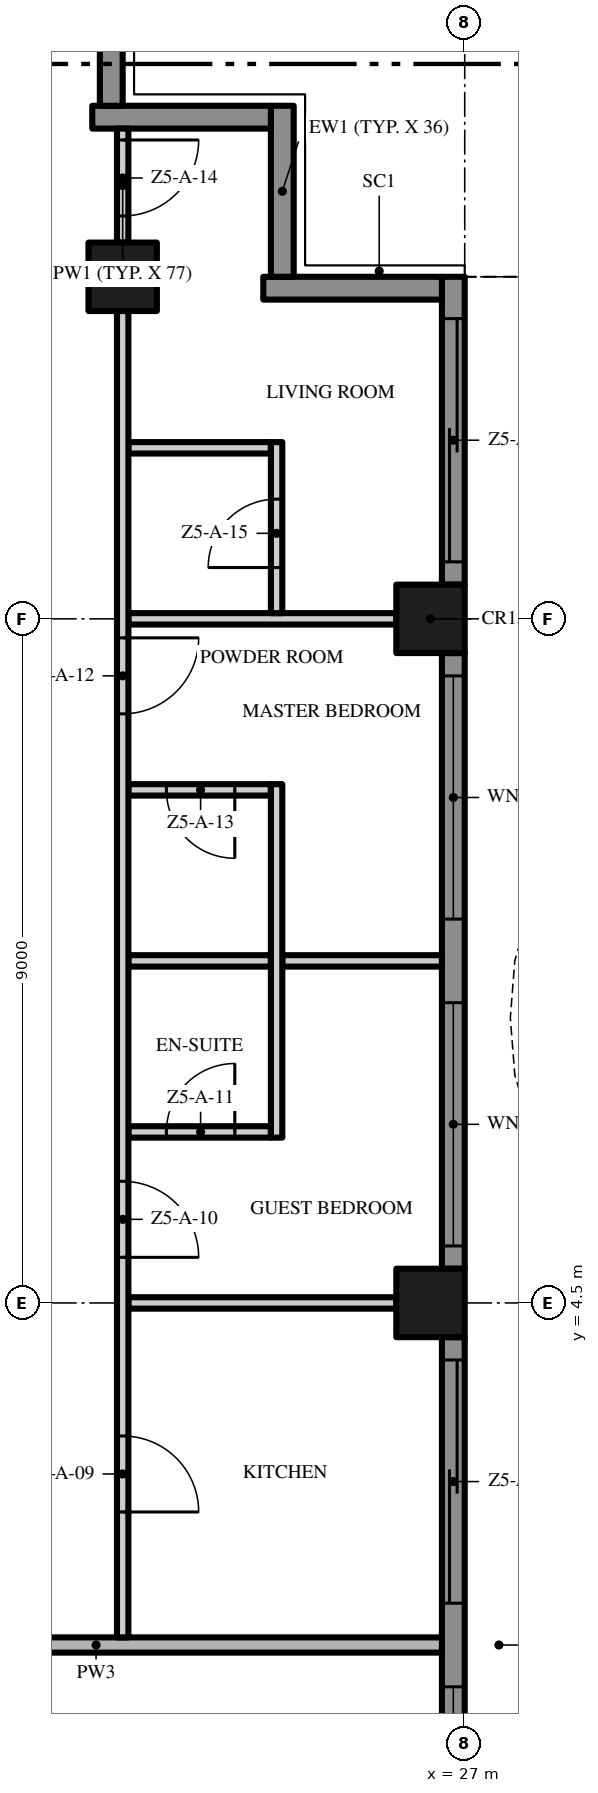
"""IFC4 building model, lengths in metres.
Left out: names, types, materials, properties, quantities, classifications, styles, units other than length and angle.
Written with IfcOpenShell. Run it as: python <this file> out.ifc"""

import sys

from ifc_helpers import new_model, si_unit, direction, frame, frame_2d, origin, origin_2d, place, context, subcontext, project, spatial, polyline, rectangle, outline, extrude, element, fill, save


model = new_model("IFC4")
c1 = context("Model", 3, precision=1e-05, world=origin(), true_north=direction((0.0, 1.0)))
c2 = subcontext(c1, "Body", "Model", "MODEL_VIEW")
j1 = project(units=[si_unit("LENGTHUNIT", "METRE"), si_unit("PLANEANGLEUNIT", "RADIAN")], contexts=[c1])
p1 = place(None, origin())
s1 = spatial("IfcSite", under=j1, at=p1, CompositionType="ELEMENT")
p2 = place(p1, origin())
s2 = spatial("IfcBuilding", under=s1, at=p2, CompositionType="ELEMENT")
p3 = place(p2, frame((0.0, 0.0, 242.6)))
s3 = spatial("IfcBuildingStorey", under=s2, at=p3, CompositionType="ELEMENT", Elevation=242.6)
for number, where, z_axis, x_axis in (
    (1, (26.55, 13.5, 0.0), (0.0, 0.0, 1.0), (1.0, 0.0, 0.0)),
    (2, (22.5, 18.0, 0.0), (0.0, 0.0, 1.0), (1.0, 0.0, 0.0)),
    (3, (26.55, 4.5, 0.0), (0.0, 0.0, 1.0), (1.0, 0.0, 0.0)),
):
    element("IfcColumn", number, at=place(p3, frame(where, z_axis=z_axis, x_axis=x_axis)), inside=s3, PredefinedType="COLUMN", context=c2, shape_type="SweptSolid", body=[
        extrude(rectangle(XDim=0.9, YDim=0.9, at=origin_2d()), origin(), (0.0, 0.0, 1.0), 3.5),
    ])
p4 = place(p3, frame((26.85, 4.05, 0.0), z_axis=(0.0, 0.0, 1.0), x_axis=(0.0, -1.0, 0.0)))
e4 = element("IfcWall", 4, at=p4, inside=s3, PredefinedType="SOLIDWALL", context=c2, shape_type="SweptSolid", body=[
    extrude(rectangle(XDim=8.1, YDim=0.3, at=frame_2d((4.05, 0.0))), origin(), (0.0, 0.0, 1.0), 3.5),
])
p5 = place(p4, frame((4.6, 0.0, 0.45)))
e5 = element("IfcOpeningElement", 5, at=p5, cuts=e4, PredefinedType="OPENING", context=c2, shape_type="SweptSolid", body=[
    extrude(rectangle(XDim=3.2, YDim=2.65, at=frame_2d((1.6, 1.325))), frame((0.0, 0.16, 0.0), z_axis=(0.0, -1.0, 0.0), x_axis=(1.0, 0.0, 0.0)), (0.0, 0.0, 1.0), 0.32),
])
p6 = place(p4, frame((0.3, 0.0, 0.0)))
e6 = element("IfcOpeningElement", 6, at=p6, cuts=e4, PredefinedType="OPENING", context=c2, shape_type="SweptSolid", body=[
    extrude(rectangle(XDim=3.2, YDim=2.4, at=frame_2d((1.6, 1.2))), frame((0.0, 0.16, 0.0), z_axis=(0.0, -1.0, 0.0), x_axis=(1.0, 0.0, 0.0)), (0.0, 0.0, 1.0), 0.32),
])
p7 = place(p3, frame((26.85, 13.05, 0.0), z_axis=(0.0, 0.0, 1.0), x_axis=(0.0, -1.0, 0.0)))
e7 = element("IfcWall", 7, at=p7, inside=s3, PredefinedType="SOLIDWALL", context=c2, shape_type="SweptSolid", body=[
    extrude(rectangle(XDim=8.1, YDim=0.3, at=frame_2d((4.05, 0.0))), origin(), (0.0, 0.0, 1.0), 3.5),
])
p8 = place(p7, frame((4.6, 0.0, 0.45)))
e8 = element("IfcOpeningElement", 8, at=p8, cuts=e7, PredefinedType="OPENING", context=c2, shape_type="SweptSolid", body=[
    extrude(rectangle(XDim=3.2, YDim=2.65, at=frame_2d((1.6, 1.325))), frame((0.0, 0.16, 0.0), z_axis=(0.0, -1.0, 0.0), x_axis=(1.0, 0.0, 0.0)), (0.0, 0.0, 1.0), 0.32),
])
p9 = place(p7, frame((0.3, 0.0, 0.45)))
e9 = element("IfcOpeningElement", 9, at=p9, cuts=e7, PredefinedType="OPENING", context=c2, shape_type="SweptSolid", body=[
    extrude(rectangle(XDim=3.2, YDim=2.65, at=frame_2d((1.6, 1.325))), frame((0.0, 0.16, 0.0), z_axis=(0.0, -1.0, 0.0), x_axis=(1.0, 0.0, 0.0)), (0.0, 0.0, 1.0), 0.32),
])
p10 = place(p3, frame((26.85, 18.0, 0.0), z_axis=(0.0, 0.0, 1.0), x_axis=(0.0, -1.0, 0.0)))
e10 = element("IfcWall", 10, at=p10, inside=s3, PredefinedType="SOLIDWALL", context=c2, shape_type="SweptSolid", body=[
    extrude(rectangle(XDim=4.05, YDim=0.3, at=frame_2d((2.025, 0.0))), origin(), (0.0, 0.0, 1.0), 3.5),
])
p11 = place(p10, frame((0.55, 0.0, 0.0)))
e11 = element("IfcOpeningElement", 11, at=p11, cuts=e10, PredefinedType="OPENING", context=c2, shape_type="SweptSolid", body=[
    extrude(rectangle(XDim=3.2, YDim=2.4, at=frame_2d((1.6, 1.2))), frame((0.0, 0.16, 0.0), z_axis=(0.0, -1.0, 0.0), x_axis=(1.0, 0.0, 0.0)), (0.0, 0.0, 1.0), 0.32),
])
p12 = place(p3, frame((24.35, 17.85, 0.0), z_axis=(0.0, 0.0, 1.0), x_axis=(1.0, 0.0, 0.0)))
e12 = element("IfcWall", 12, at=p12, inside=s3, PredefinedType="SOLIDWALL", context=c2, shape_type="SweptSolid", body=[
    extrude(rectangle(XDim=2.35, YDim=0.3, at=frame_2d((1.175, 0.0))), origin(), (0.0, 0.0, 1.0), 3.5),
])
p13 = place(p3, frame((24.6, 20.25, 0.0), z_axis=(0.0, 0.0, 1.0), x_axis=(0.0, -1.0, 0.0)))
e13 = element("IfcWall", 13, at=p13, inside=s3, PredefinedType="SOLIDWALL", context=c2, shape_type="SweptSolid", body=[
    extrude(rectangle(XDim=2.25, YDim=0.3, at=frame_2d((1.125, 0.0))), origin(), (0.0, 0.0, 1.0), 3.5),
])
p14 = place(p3, frame((22.1, 20.1, 0.0), z_axis=(0.0, 0.0, 1.0), x_axis=(1.0, 0.0, 0.0)))
e14 = element("IfcWall", 14, at=p14, inside=s3, PredefinedType="SOLIDWALL", context=c2, shape_type="SweptSolid", body=[
    extrude(rectangle(XDim=2.35, YDim=0.3, at=frame_2d((1.175, 0.0))), origin(), (0.0, 0.0, 1.0), 3.5),
])
p15 = place(p3, frame((22.35, 22.5, 0.0), z_axis=(0.0, 0.0, 1.0), x_axis=(0.0, -1.0, 0.0)))
e15 = element("IfcWall", 15, at=p15, inside=s3, PredefinedType="SOLIDWALL", context=c2, shape_type="SweptSolid", body=[
    extrude(rectangle(XDim=2.25, YDim=0.3, at=frame_2d((1.125, 0.0))), origin(), (0.0, 0.0, 1.0), 3.5),
])
p16 = place(p3, origin())
e16 = element("IfcWall", 16, at=p16, inside=s3, PredefinedType="USERDEFINED", context=c2, shape_type="SweptSolid", body=[
    extrude(outline(polyline([(28.8, -18.0), (29.505, -16.5), (29.941, -15.0), (30.0, -14.25), (29.941, -13.5), (29.505, -12.0), (28.8, -10.5), (28.095, -9.0), (27.659, -7.5), (27.6, -6.75), (27.659, -6.0), (28.095, -4.5), (28.8, -3.0), (29.505, -1.5), (29.941, 0.0), (30.0, 0.75), (29.941, 1.5), (29.505, 3.0), (28.8, 4.5), (28.095, 6.0), (27.659, 7.5), (27.6, 8.25), (27.659, 9.0), (28.095, 10.5), (28.8, 12.0), (29.505, 13.5), (29.941, 15.0), (30.0, 15.75), (29.941, 16.5), (29.505, 18.0), (29.265, 17.93), (29.694, 16.455), (29.749, 15.75), (29.694, 15.045), (29.271, 13.589), (28.574, 12.106), (27.86, 10.589), (27.411, 9.045), (27.349, 8.25), (27.411, 7.455), (27.86, 5.911), (28.574, 4.394), (29.271, 2.911), (29.694, 1.455), (29.749, 0.75), (29.694, 0.045), (29.271, -1.411), (28.574, -2.894), (27.86, -4.411), (27.411, -5.955), (27.349, -6.75), (27.411, -7.545), (27.86, -9.089), (28.574, -10.606), (29.271, -12.089), (29.694, -13.545), (29.749, -14.25), (29.694, -14.955), (29.271, -16.411), (28.574, -17.894), (28.8, -18.0)])), origin(), (0.0, 0.0, 1.0), 0.9),
])
p17 = place(p3, frame((17.6, 0.0, 0.0), z_axis=(0.0, 0.0, 1.0), x_axis=(1.0, 0.0, 0.0)))
e17 = element("IfcWall", 17, at=p17, inside=s3, PredefinedType="PARTITIONING", context=c2, shape_type="SweptSolid", body=[
    extrude(rectangle(XDim=9.1, YDim=0.2, at=frame_2d((4.55, 0.0))), origin(), (0.0, 0.0, 1.0), 3.5),
])
p18 = place(p3, frame((22.575, 4.5, 0.0), z_axis=(0.0, 0.0, 1.0), x_axis=(1.0, 0.0, 0.0)))
e18 = element("IfcWall", 18, at=p18, inside=s3, PredefinedType="PARTITIONING", context=c2, shape_type="SweptSolid", body=[
    extrude(rectangle(XDim=3.525, YDim=0.15, at=frame_2d((1.762, 0.0))), origin(), (0.0, 0.0, 1.0), 3.5),
])
p19 = place(p3, frame((22.575, 6.75, 0.0), z_axis=(0.0, 0.0, 1.0), x_axis=(1.0, 0.0, 0.0)))
e19 = element("IfcWall", 19, at=p19, inside=s3, PredefinedType="PARTITIONING", context=c2, shape_type="SweptSolid", body=[
    extrude(rectangle(XDim=1.875, YDim=0.15, at=frame_2d((0.938, 0.0))), origin(), (0.0, 0.0, 1.0), 3.5),
])
p20 = place(p19, frame((0.5, 0.0, 0.0)))
e20 = element("IfcOpeningElement", 20, at=p20, cuts=e19, PredefinedType="OPENING", context=c2, shape_type="SweptSolid", body=[
    extrude(rectangle(XDim=0.9, YDim=2.1, at=frame_2d((0.45, 1.05))), frame((0.0, 0.085, 0.0), z_axis=(0.0, -1.0, 0.0), x_axis=(1.0, 0.0, 0.0)), (0.0, 0.0, 1.0), 0.17),
])
p21 = place(p3, frame((22.575, 9.0, 0.0), z_axis=(0.0, 0.0, 1.0), x_axis=(1.0, 0.0, 0.0)))
e21 = element("IfcWall", 21, at=p21, inside=s3, PredefinedType="PARTITIONING", context=c2, shape_type="SweptSolid", body=[
    extrude(rectangle(XDim=1.875, YDim=0.15, at=frame_2d((0.938, 0.0))), origin(), (0.0, 0.0, 1.0), 3.5),
])
p22 = place(p3, frame((24.6, 9.0, 0.0), z_axis=(0.0, 0.0, 1.0), x_axis=(1.0, 0.0, 0.0)))
e22 = element("IfcWall", 22, at=p22, inside=s3, PredefinedType="PARTITIONING", context=c2, shape_type="SweptSolid", body=[
    extrude(rectangle(XDim=2.1, YDim=0.15, at=frame_2d((1.05, 0.0))), origin(), (0.0, 0.0, 1.0), 3.5),
])
p23 = place(p3, frame((24.45, 11.25, 0.0), z_axis=(0.0, 0.0, 1.0), x_axis=(-1.0, 0.0, 0.0)))
e23 = element("IfcWall", 23, at=p23, inside=s3, PredefinedType="PARTITIONING", context=c2, shape_type="SweptSolid", body=[
    extrude(rectangle(XDim=1.875, YDim=0.15, at=frame_2d((0.938, 0.0))), origin(), (0.0, 0.0, 1.0), 3.5),
])
p24 = place(p23, frame((0.475, 0.0, 0.0)))
e24 = element("IfcOpeningElement", 24, at=p24, cuts=e23, PredefinedType="OPENING", context=c2, shape_type="SweptSolid", body=[
    extrude(rectangle(XDim=0.9, YDim=2.1, at=frame_2d((0.45, 1.05))), frame((0.0, 0.085, 0.0), z_axis=(0.0, -1.0, 0.0), x_axis=(1.0, 0.0, 0.0)), (0.0, 0.0, 1.0), 0.17),
])
p25 = place(p3, frame((22.575, 13.5, 0.0), z_axis=(0.0, 0.0, 1.0), x_axis=(1.0, 0.0, 0.0)))
e25 = element("IfcWall", 25, at=p25, inside=s3, PredefinedType="PARTITIONING", context=c2, shape_type="SweptSolid", body=[
    extrude(rectangle(XDim=3.525, YDim=0.15, at=frame_2d((1.762, 0.0))), origin(), (0.0, 0.0, 1.0), 3.5),
])
p26 = place(p3, frame((22.575, 15.75, 0.0), z_axis=(0.0, 0.0, 1.0), x_axis=(1.0, 0.0, 0.0)))
e26 = element("IfcWall", 26, at=p26, inside=s3, PredefinedType="PARTITIONING", context=c2, shape_type="SweptSolid", body=[
    extrude(rectangle(XDim=1.875, YDim=0.15, at=frame_2d((0.938, 0.0))), origin(), (0.0, 0.0, 1.0), 3.5),
])
p27 = place(p3, frame((22.5, 17.55, 0.0), z_axis=(0.0, 0.0, 1.0), x_axis=(0.0, -1.0, 0.0)))
e27 = element("IfcWall", 27, at=p27, inside=s3, PredefinedType="PARTITIONING", context=c2, shape_type="SweptSolid", body=[
    extrude(rectangle(XDim=17.45, YDim=0.15, at=frame_2d((8.725, 0.0))), origin(), (0.0, 0.0, 1.0), 3.5),
])
p28 = place(p27, frame((14.8, 0.0, 0.0)))
e28 = element("IfcOpeningElement", 28, at=p28, cuts=e27, PredefinedType="OPENING", context=c2, shape_type="SweptSolid", body=[
    extrude(rectangle(XDim=1.0, YDim=2.4, at=frame_2d((0.5, 1.2))), frame((0.0, 0.085, 0.0), z_axis=(0.0, -1.0, 0.0), x_axis=(1.0, 0.0, 0.0)), (0.0, 0.0, 1.0), 0.17),
])
p29 = place(p27, frame((11.45, 0.0, 0.0)))
e29 = element("IfcOpeningElement", 29, at=p29, cuts=e27, PredefinedType="OPENING", context=c2, shape_type="SweptSolid", body=[
    extrude(rectangle(XDim=1.0, YDim=2.4, at=frame_2d((0.5, 1.2))), frame((0.0, 0.085, 0.0), z_axis=(0.0, -1.0, 0.0), x_axis=(1.0, 0.0, 0.0)), (0.0, 0.0, 1.0), 0.17),
])
p30 = place(p27, frame((4.3, 0.0, 0.0)))
e30 = element("IfcOpeningElement", 30, at=p30, cuts=e27, PredefinedType="OPENING", context=c2, shape_type="SweptSolid", body=[
    extrude(rectangle(XDim=1.0, YDim=2.4, at=frame_2d((0.5, 1.2))), frame((0.0, 0.085, 0.0), z_axis=(0.0, -1.0, 0.0), x_axis=(1.0, 0.0, 0.0)), (0.0, 0.0, 1.0), 0.17),
])
p31 = place(p3, frame((22.5, 19.95, 0.0), z_axis=(0.0, 0.0, 1.0), x_axis=(0.0, -1.0, 0.0)))
e31 = element("IfcWall", 31, at=p31, inside=s3, PredefinedType="PARTITIONING", context=c2, shape_type="SweptSolid", body=[
    extrude(rectangle(XDim=1.5, YDim=0.15, at=frame_2d((0.75, 0.0))), origin(), (0.0, 0.0, 1.0), 3.5),
])
p32 = place(p31, frame((0.15, 0.0, 0.0)))
e32 = element("IfcOpeningElement", 32, at=p32, cuts=e31, PredefinedType="OPENING", context=c2, shape_type="SweptSolid", body=[
    extrude(rectangle(XDim=1.0, YDim=2.4, at=frame_2d((0.5, 1.2))), frame((0.0, 0.085, 0.0), z_axis=(0.0, -1.0, 0.0), x_axis=(1.0, 0.0, 0.0)), (0.0, 0.0, 1.0), 0.17),
])
p33 = place(p3, frame((24.525, 6.675, 0.0), z_axis=(0.0, 0.0, 1.0), x_axis=(0.0, 1.0, 0.0)))
e33 = element("IfcWall", 33, at=p33, inside=s3, PredefinedType="PARTITIONING", context=c2, shape_type="SweptSolid", body=[
    extrude(rectangle(XDim=4.65, YDim=0.15, at=frame_2d((2.325, 0.0))), origin(), (0.0, 0.0, 1.0), 3.5),
])
p34 = place(p3, frame((24.525, 13.575, 0.0), z_axis=(0.0, 0.0, 1.0), x_axis=(0.0, 1.0, 0.0)))
e34 = element("IfcWall", 34, at=p34, inside=s3, PredefinedType="PARTITIONING", context=c2, shape_type="SweptSolid", body=[
    extrude(rectangle(XDim=2.25, YDim=0.15, at=frame_2d((1.125, 0.0))), origin(), (0.0, 0.0, 1.0), 3.5),
])
p35 = place(p34, frame((0.6, 0.0, 0.0)))
e35 = element("IfcOpeningElement", 35, at=p35, cuts=e34, PredefinedType="OPENING", context=c2, shape_type="SweptSolid", body=[
    extrude(rectangle(XDim=0.9, YDim=2.1, at=frame_2d((0.45, 1.05))), frame((0.0, 0.085, 0.0), z_axis=(0.0, -1.0, 0.0), x_axis=(1.0, 0.0, 0.0)), (0.0, 0.0, 1.0), 0.17),
])
p36 = place(p5, origin())
e36 = element("IfcWindow", 36, at=p36, inside=s3, PartitioningType="SINGLE_PANEL", PredefinedType="WINDOW", context=c2, shape_type="SweptSolid", body=[
    extrude(rectangle(XDim=3.2, YDim=2.65, at=frame_2d((1.6, 1.325))), frame((0.0, 0.03, 0.0), z_axis=(0.0, -1.0, 0.0), x_axis=(1.0, 0.0, 0.0)), (0.0, 0.0, 1.0), 0.06),
])
fill(e5, e36)
p37 = place(p6, origin())
e37 = element("IfcDoor", 37, at=p37, inside=s3, OperationType="SINGLE_SWING_LEFT", PredefinedType="DOOR", context=c2, shape_type="SweptSolid", body=[
    extrude(rectangle(XDim=3.2, YDim=2.4, at=frame_2d((1.6, 1.2))), frame((0.0, 0.025, 0.0), z_axis=(0.0, -1.0, 0.0), x_axis=(1.0, 0.0, 0.0)), (0.0, 0.0, 1.0), 0.05),
])
fill(e6, e37)
p38 = place(p8, origin())
e38 = element("IfcWindow", 38, at=p38, inside=s3, PartitioningType="SINGLE_PANEL", PredefinedType="WINDOW", context=c2, shape_type="SweptSolid", body=[
    extrude(rectangle(XDim=3.2, YDim=2.65, at=frame_2d((1.6, 1.325))), frame((0.0, 0.03, 0.0), z_axis=(0.0, -1.0, 0.0), x_axis=(1.0, 0.0, 0.0)), (0.0, 0.0, 1.0), 0.06),
])
fill(e8, e38)
p39 = place(p9, origin())
e39 = element("IfcWindow", 39, at=p39, inside=s3, PartitioningType="SINGLE_PANEL", PredefinedType="WINDOW", context=c2, shape_type="SweptSolid", body=[
    extrude(rectangle(XDim=3.2, YDim=2.65, at=frame_2d((1.6, 1.325))), frame((0.0, 0.03, 0.0), z_axis=(0.0, -1.0, 0.0), x_axis=(1.0, 0.0, 0.0)), (0.0, 0.0, 1.0), 0.06),
])
fill(e9, e39)
p40 = place(p11, origin())
e40 = element("IfcDoor", 40, at=p40, inside=s3, OperationType="SINGLE_SWING_LEFT", PredefinedType="DOOR", context=c2, shape_type="SweptSolid", body=[
    extrude(rectangle(XDim=3.2, YDim=2.4, at=frame_2d((1.6, 1.2))), frame((0.0, 0.025, 0.0), z_axis=(0.0, -1.0, 0.0), x_axis=(1.0, 0.0, 0.0)), (0.0, 0.0, 1.0), 0.05),
])
fill(e11, e40)
p41 = place(p28, origin())
e41 = element("IfcDoor", 41, at=p41, inside=s3, OperationType="SINGLE_SWING_RIGHT", PredefinedType="DOOR", context=c2, shape_type="SweptSolid", body=[
    extrude(rectangle(XDim=1.0, YDim=2.4, at=frame_2d((0.5, 1.2))), frame((0.0, 0.025, 0.0), z_axis=(0.0, -1.0, 0.0), x_axis=(1.0, 0.0, 0.0)), (0.0, 0.0, 1.0), 0.05),
])
fill(e28, e41)
p42 = place(p29, origin())
e42 = element("IfcDoor", 42, at=p42, inside=s3, OperationType="SINGLE_SWING_RIGHT", PredefinedType="DOOR", context=c2, shape_type="SweptSolid", body=[
    extrude(rectangle(XDim=1.0, YDim=2.4, at=frame_2d((0.5, 1.2))), frame((0.0, 0.025, 0.0), z_axis=(0.0, -1.0, 0.0), x_axis=(1.0, 0.0, 0.0)), (0.0, 0.0, 1.0), 0.05),
])
fill(e29, e42)
p43 = place(p20, origin())
e43 = element("IfcDoor", 43, at=p43, inside=s3, OperationType="SINGLE_SWING_RIGHT", PredefinedType="DOOR", context=c2, shape_type="SweptSolid", body=[
    extrude(rectangle(XDim=0.9, YDim=2.1, at=frame_2d((0.45, 1.05))), frame((0.0, 0.025, 0.0), z_axis=(0.0, -1.0, 0.0), x_axis=(1.0, 0.0, 0.0)), (0.0, 0.0, 1.0), 0.05),
])
fill(e20, e43)
p44 = place(p30, origin())
e44 = element("IfcDoor", 44, at=p44, inside=s3, OperationType="SINGLE_SWING_LEFT", PredefinedType="DOOR", context=c2, shape_type="SweptSolid", body=[
    extrude(rectangle(XDim=1.0, YDim=2.4, at=frame_2d((0.5, 1.2))), frame((0.0, 0.025, 0.0), z_axis=(0.0, -1.0, 0.0), x_axis=(1.0, 0.0, 0.0)), (0.0, 0.0, 1.0), 0.05),
])
fill(e30, e44)
p45 = place(p24, origin())
e45 = element("IfcDoor", 45, at=p45, inside=s3, OperationType="SINGLE_SWING_LEFT", PredefinedType="DOOR", context=c2, shape_type="SweptSolid", body=[
    extrude(rectangle(XDim=0.9, YDim=2.1, at=frame_2d((0.45, 1.05))), frame((0.0, 0.025, 0.0), z_axis=(0.0, -1.0, 0.0), x_axis=(1.0, 0.0, 0.0)), (0.0, 0.0, 1.0), 0.05),
])
fill(e24, e45)
p46 = place(p32, origin())
e46 = element("IfcDoor", 46, at=p46, inside=s3, OperationType="SINGLE_SWING_LEFT", PredefinedType="DOOR", context=c2, shape_type="SweptSolid", body=[
    extrude(rectangle(XDim=1.0, YDim=2.4, at=frame_2d((0.5, 1.2))), frame((0.0, 0.025, 0.0), z_axis=(0.0, -1.0, 0.0), x_axis=(1.0, 0.0, 0.0)), (0.0, 0.0, 1.0), 0.05),
])
fill(e32, e46)
p47 = place(p35, origin())
e47 = element("IfcDoor", 47, at=p47, inside=s3, OperationType="SINGLE_SWING_LEFT", PredefinedType="DOOR", context=c2, shape_type="SweptSolid", body=[
    extrude(rectangle(XDim=0.9, YDim=2.1, at=frame_2d((0.45, 1.05))), frame((0.0, 0.025, 0.0), z_axis=(0.0, -1.0, 0.0), x_axis=(1.0, 0.0, 0.0)), (0.0, 0.0, 1.0), 0.05),
])
fill(e35, e47)
save(model, sys.argv[1])
